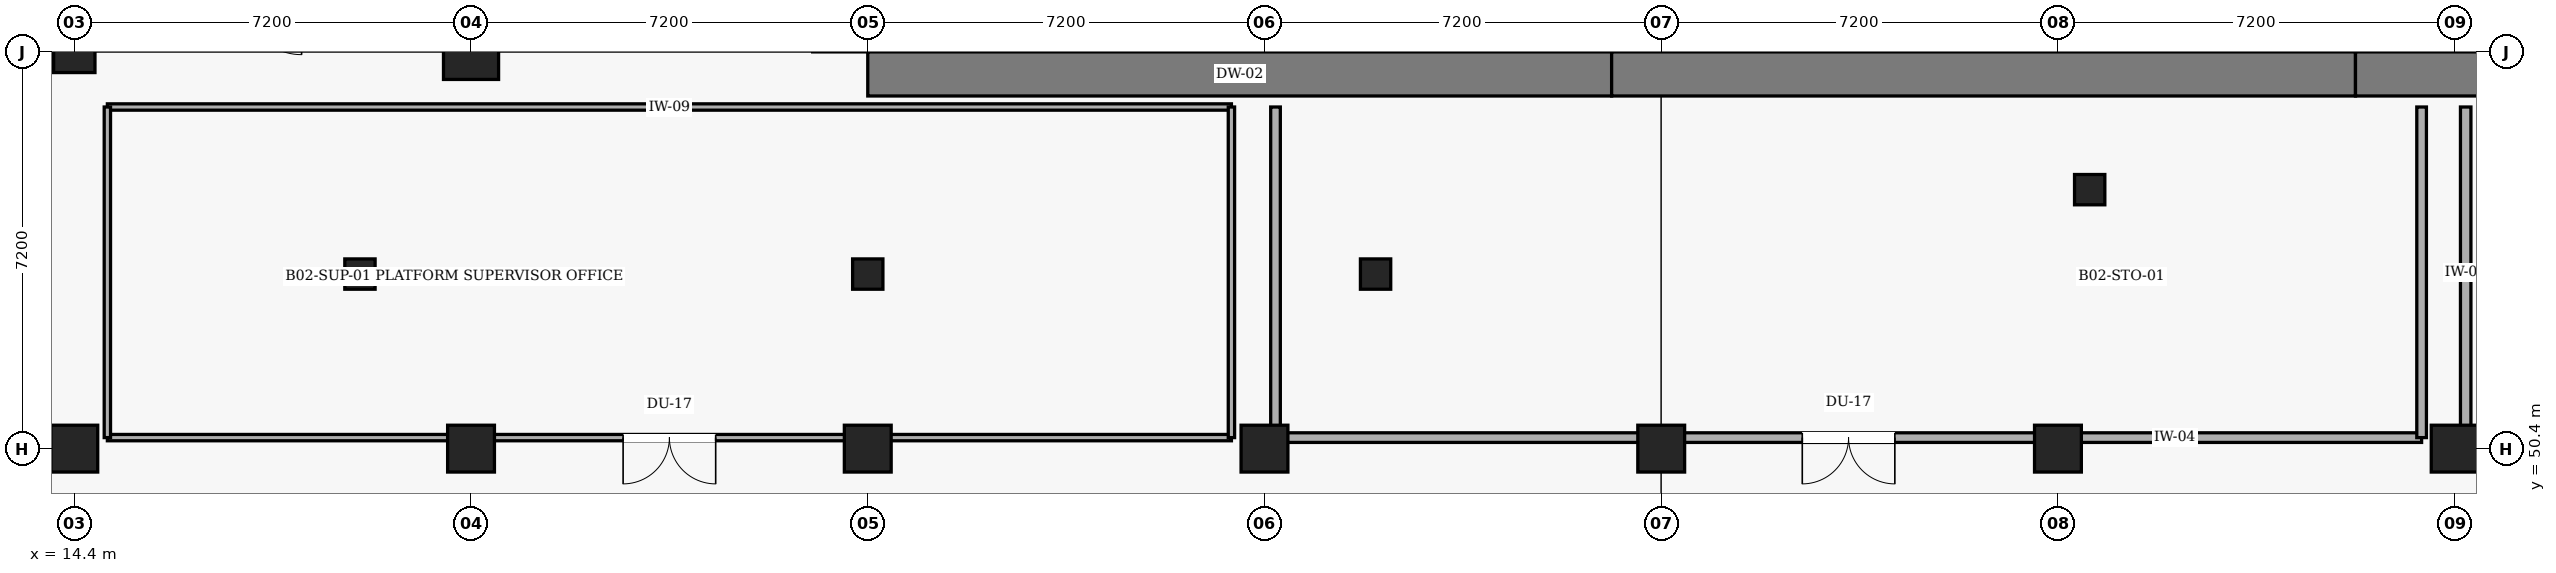
"""IFC4 building model, lengths in metres.
Left out: names, types, materials, properties, quantities, classifications, styles, units other than length and angle.
Written with IfcOpenShell. Run it as: python <this file> out.ifc"""

import sys

from ifc_helpers import new_model, si_unit, direction, frame, frame_2d, origin, origin_2d, place, context, subcontext, project, spatial, rectangle, extrude, element, fill, save


model = new_model("IFC4")
c1 = context("Model", 3, precision=1e-05, world=origin(), true_north=direction((0.0, 1.0)))
c2 = subcontext(c1, "Body", "Model", "MODEL_VIEW")
j1 = project(units=[si_unit("LENGTHUNIT", "METRE"), si_unit("PLANEANGLEUNIT", "RADIAN")], contexts=[c1])
p1 = place(None, origin())
s1 = spatial("IfcSite", under=j1, at=p1, CompositionType="ELEMENT")
p2 = place(p1, origin())
s2 = spatial("IfcBuilding", under=s1, at=p2, CompositionType="ELEMENT")
p3 = place(p2, frame((0.0, 0.0, -10.8)))
s3 = spatial("IfcBuildingStorey", under=s2, at=p3, CompositionType="ELEMENT", Elevation=-10.8)
for number, where, z_axis, x_axis in (
    (1, (28.8, 57.2, 0.0), (0.0, 0.0, 1.0), (1.0, 0.0, 0.0)),
    (2, (42.3, 57.2, 0.0), (0.0, 0.0, 1.0), (1.0, 0.0, 0.0)),
    (3, (55.8, 57.2, 0.0), (0.0, 0.0, 1.0), (1.0, 0.0, 0.0)),
):
    element("IfcWall", number, at=place(p3, frame(where, z_axis=z_axis, x_axis=x_axis)), inside=s3, PredefinedType="USERDEFINED", context=c2, shape_type="SweptSolid", body=[
        extrude(rectangle(XDim=13.5, YDim=0.8, at=frame_2d((6.75, 0.0))), origin(), (0.0, 0.0, 1.0), 5.0),
    ])
p4 = place(p3, frame((14.4, 50.4, 0.0), z_axis=(0.0, 0.0, 1.0), x_axis=(1.0, 0.0, 0.0)))
e4 = element("IfcColumn", 4, at=p4, inside=s3, PredefinedType="COLUMN", context=c2, shape_type="SweptSolid", body=[
    extrude(rectangle(XDim=0.85, YDim=0.85, at=origin_2d()), origin(), (0.0, 0.0, 1.0), 5.0),
])
p5 = place(p3, frame((14.4, 57.6, 0.0), z_axis=(0.0, 0.0, 1.0), x_axis=(1.0, 0.0, 0.0)))
e5 = element("IfcColumn", 5, at=p5, inside=s3, PredefinedType="COLUMN", context=c2, shape_type="SweptSolid", body=[
    extrude(rectangle(XDim=0.75, YDim=0.75, at=origin_2d()), origin(), (0.0, 0.0, 1.0), 5.0),
])
p6 = place(p3, frame((21.6, 50.4, 0.0), z_axis=(0.0, 0.0, 1.0), x_axis=(1.0, 0.0, 0.0)))
e6 = element("IfcColumn", 6, at=p6, inside=s3, PredefinedType="COLUMN", context=c2, shape_type="SweptSolid", body=[
    extrude(rectangle(XDim=0.85, YDim=0.85, at=origin_2d()), origin(), (0.0, 0.0, 1.0), 5.0),
])
p7 = place(p3, frame((21.6, 57.6, 0.0), z_axis=(0.0, 0.0, 1.0), x_axis=(1.0, 0.0, 0.0)))
e7 = element("IfcColumn", 7, at=p7, inside=s3, PredefinedType="COLUMN", context=c2, shape_type="SweptSolid", body=[
    extrude(rectangle(XDim=1.0, YDim=1.0, at=origin_2d()), origin(), (0.0, 0.0, 1.0), 5.0),
])
for number, where, z_axis, x_axis in (
    (8, (28.8, 50.4, 0.0), (0.0, 0.0, 1.0), (1.0, 0.0, 0.0)),
    (9, (36.0, 50.4, 0.0), (0.0, 0.0, 1.0), (1.0, 0.0, 0.0)),
    (10, (43.2, 50.4, 0.0), (0.0, 0.0, 1.0), (1.0, 0.0, 0.0)),
    (11, (50.4, 50.4, 0.0), (0.0, 0.0, 1.0), (1.0, 0.0, 0.0)),
    (12, (57.6, 50.4, 0.0), (0.0, 0.0, 1.0), (1.0, 0.0, 0.0)),
):
    element("IfcColumn", number, at=place(p3, frame(where, z_axis=z_axis, x_axis=x_axis)), inside=s3, PredefinedType="COLUMN", context=c2, shape_type="SweptSolid", body=[
        extrude(rectangle(XDim=0.85, YDim=0.85, at=origin_2d()), origin(), (0.0, 0.0, 1.0), 5.0),
    ])
for number, where, z_axis, x_axis in (
    (13, (19.584, 53.568, 0.0), (0.0, 0.0, 1.0), (1.0, 0.0, 0.0)),
    (14, (28.8, 53.568, 0.0), (0.0, 0.0, 1.0), (1.0, 0.0, 0.0)),
    (15, (38.016, 53.568, 0.0), (0.0, 0.0, 1.0), (1.0, 0.0, 0.0)),
    (16, (50.976, 55.1, 0.0), (0.0, 0.0, 1.0), (1.0, 0.0, 0.0)),
):
    element("IfcColumn", number, at=place(p3, frame(where, z_axis=z_axis, x_axis=x_axis)), inside=s3, PredefinedType="COLUMN", context=c2, shape_type="SweptSolid", body=[
        extrude(rectangle(XDim=0.55, YDim=0.55, at=origin_2d()), origin(), (0.0, 0.0, 1.0), 5.0),
    ])
p8 = place(p3, frame((15.0, 56.6, 0.0), z_axis=(0.0, 0.0, 1.0), x_axis=(1.0, 0.0, 0.0)))
e17 = element("IfcWall", 17, at=p8, inside=s3, PredefinedType="PARTITIONING", context=c2, shape_type="SweptSolid", body=[
    extrude(rectangle(XDim=20.4, YDim=0.115, at=frame_2d((10.2, 0.0))), origin(), (0.0, 0.0, 1.0), 4.2),
])
p9 = place(p3, frame((35.4, 50.6, 0.0), z_axis=(0.0, 0.0, 1.0), x_axis=(-1.0, 0.0, 0.0)))
e18 = element("IfcWall", 18, at=p9, inside=s3, PredefinedType="PARTITIONING", context=c2, shape_type="SweptSolid", body=[
    extrude(rectangle(XDim=20.4, YDim=0.115, at=frame_2d((10.2, 0.0))), origin(), (0.0, 0.0, 1.0), 4.1),
])
p10 = place(p9, frame((9.36, 0.0, 0.0)))
e19 = element("IfcOpeningElement", 19, at=p10, cuts=e18, PredefinedType="OPENING", context=c2, shape_type="SweptSolid", body=[
    extrude(rectangle(XDim=1.68, YDim=2.28, at=frame_2d((0.84, 1.14))), frame((0.0, 0.067, 0.0), z_axis=(0.0, -1.0, 0.0), x_axis=(1.0, 0.0, 0.0)), (0.0, 0.0, 1.0), 0.135),
])
for number, where, z_axis, x_axis in (
    (20, (35.4, 56.6, 0.0), (0.0, 0.0, 1.0), (0.0, -1.0, 0.0)),
    (21, (15.0, 50.6, 0.0), (0.0, 0.0, 1.0), (0.0, 1.0, 0.0)),
):
    element("IfcWall", number, at=place(p3, frame(where, z_axis=z_axis, x_axis=x_axis)), inside=s3, PredefinedType="PARTITIONING", context=c2, shape_type="SweptSolid", body=[
        extrude(rectangle(XDim=6.0, YDim=0.115, at=frame_2d((3.0, 0.0))), origin(), (0.0, 0.0, 1.0), 5.05),
    ])
p11 = place(p3, frame((57.0, 50.6, 0.0), z_axis=(0.0, 0.0, 1.0), x_axis=(-1.0, 0.0, 0.0)))
e22 = element("IfcWall", 22, at=p11, inside=s3, PredefinedType="PARTITIONING", context=c2, shape_type="SweptSolid", body=[
    extrude(rectangle(XDim=20.8, YDim=0.175, at=frame_2d((10.4, 0.0))), origin(), (0.0, 0.0, 1.0), 4.1),
])
p12 = place(p11, frame((9.56, 0.0, 0.0)))
e23 = element("IfcOpeningElement", 23, at=p12, cuts=e22, PredefinedType="OPENING", context=c2, shape_type="SweptSolid", body=[
    extrude(rectangle(XDim=1.68, YDim=2.28, at=frame_2d((0.84, 1.14))), frame((0.0, 0.097, 0.0), z_axis=(0.0, -1.0, 0.0), x_axis=(1.0, 0.0, 0.0)), (0.0, 0.0, 1.0), 0.195),
])
p13 = place(p3, frame((57.0, 56.6, 0.0), z_axis=(0.0, 0.0, 1.0), x_axis=(0.0, -1.0, 0.0)))
e24 = element("IfcWall", 24, at=p13, inside=s3, PredefinedType="PARTITIONING", context=c2, shape_type="SweptSolid", body=[
    extrude(rectangle(XDim=6.0, YDim=0.175, at=frame_2d((3.0, 0.0))), origin(), (0.0, 0.0, 1.0), 5.05),
])
p14 = place(p3, frame((36.2, 50.6, 0.0), z_axis=(0.0, 0.0, 1.0), x_axis=(0.0, 1.0, 0.0)))
e25 = element("IfcWall", 25, at=p14, inside=s3, PredefinedType="PARTITIONING", context=c2, shape_type="SweptSolid", body=[
    extrude(rectangle(XDim=6.0, YDim=0.175, at=frame_2d((3.0, 0.0))), origin(), (0.0, 0.0, 1.0), 4.2),
])
p15 = place(p3, frame((83.8, 50.6, 0.0), z_axis=(0.0, 0.0, 1.0), x_axis=(-1.0, 0.0, 0.0)))
e26 = element("IfcWall", 26, at=p15, inside=s3, PredefinedType="PARTITIONING", context=c2, shape_type="SweptSolid", body=[
    extrude(rectangle(XDim=26.0, YDim=0.19, at=frame_2d((13.0, 0.0))), origin(), (0.0, 0.0, 1.0), 4.1),
])
p16 = place(p15, frame((12.76, 0.0, 0.0)))
e27 = element("IfcOpeningElement", 27, at=p16, cuts=e26, PredefinedType="OPENING", context=c2, shape_type="SweptSolid", body=[
    extrude(rectangle(XDim=1.68, YDim=2.28, at=frame_2d((0.84, 1.14))), frame((0.0, 0.105, 0.0), z_axis=(0.0, -1.0, 0.0), x_axis=(1.0, 0.0, 0.0)), (0.0, 0.0, 1.0), 0.21),
])
p17 = place(p3, frame((57.8, 50.6, 0.0), z_axis=(0.0, 0.0, 1.0), x_axis=(0.0, 1.0, 0.0)))
e28 = element("IfcWall", 28, at=p17, inside=s3, PredefinedType="PARTITIONING", context=c2, shape_type="SweptSolid", body=[
    extrude(rectangle(XDim=6.0, YDim=0.19, at=frame_2d((3.0, 0.0))), origin(), (0.0, 0.0, 1.0), 4.2),
])
p18 = place(p10, origin())
e29 = element("IfcDoor", 29, at=p18, inside=s3, OperationType="DOUBLE_DOOR_SINGLE_SWING", PredefinedType="DOOR", context=c2, shape_type="SweptSolid", body=[
    extrude(rectangle(XDim=1.68, YDim=2.28, at=frame_2d((0.84, 1.14))), frame((0.0, 0.025, 0.0), z_axis=(0.0, -1.0, 0.0), x_axis=(1.0, 0.0, 0.0)), (0.0, 0.0, 1.0), 0.05),
])
fill(e19, e29)
p19 = place(p12, origin())
e30 = element("IfcDoor", 30, at=p19, inside=s3, OperationType="DOUBLE_DOOR_SINGLE_SWING", PredefinedType="DOOR", context=c2, shape_type="SweptSolid", body=[
    extrude(rectangle(XDim=1.68, YDim=2.28, at=frame_2d((0.84, 1.14))), frame((0.0, 0.025, 0.0), z_axis=(0.0, -1.0, 0.0), x_axis=(1.0, 0.0, 0.0)), (0.0, 0.0, 1.0), 0.05),
])
fill(e23, e30)
save(model, sys.argv[1])
